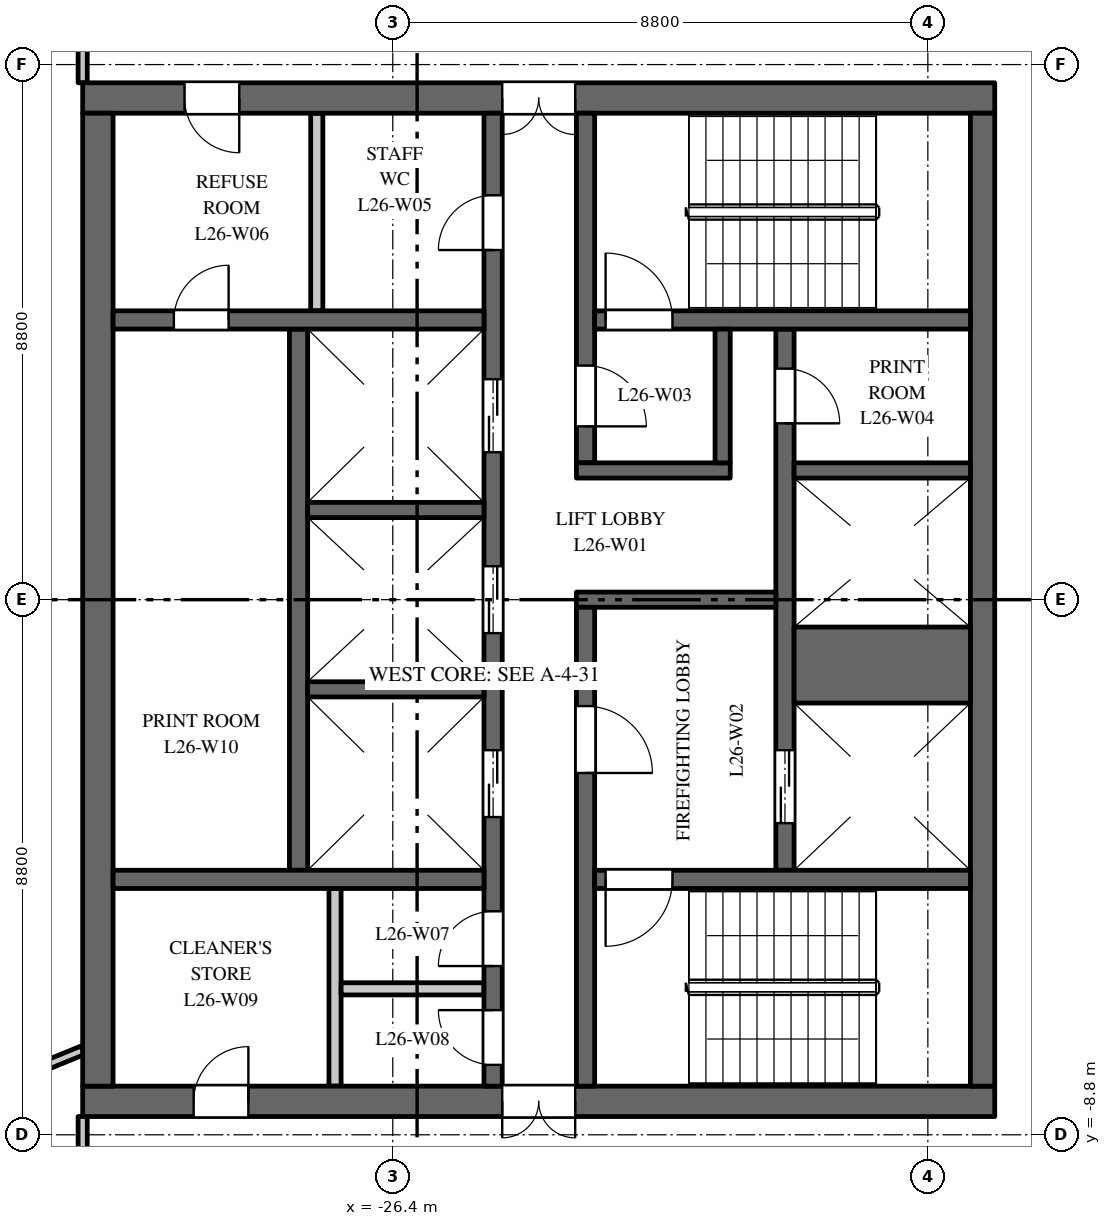
"""IFC4 building model, lengths in metres.
Left out: names, types, materials, properties, quantities, classifications, styles, units other than length and angle.
Written with IfcOpenShell. Run it as: python <this file> out.ifc"""

import sys

from ifc_helpers import new_model, si_unit, direction, frame, frame_2d, origin, place, context, subcontext, project, spatial, rectangle, extrude, element, fill, save


model = new_model("IFC4")
c1 = context("Model", 3, precision=1e-05, world=origin(), true_north=direction((0.0, 1.0)))
c2 = subcontext(c1, "Body", "Model", "MODEL_VIEW")
j1 = project(units=[si_unit("LENGTHUNIT", "METRE"), si_unit("PLANEANGLEUNIT", "RADIAN")], contexts=[c1])
p1 = place(None, origin())
s1 = spatial("IfcSite", under=j1, at=p1, CompositionType="ELEMENT")
p2 = place(p1, origin())
s2 = spatial("IfcBuilding", under=s1, at=p2, CompositionType="ELEMENT")
p3 = place(p2, frame((0.0, 0.0, 116.0)))
s3 = spatial("IfcBuildingStorey", under=s2, at=p3, CompositionType="ELEMENT", Elevation=116.0)
p4 = place(p3, frame((-16.5, 8.25, 0.0), z_axis=(0.0, 0.0, 1.0), x_axis=(-1.0, 0.0, 0.0)))
e1 = element("IfcWall", 1, at=p4, inside=s3, PredefinedType="SHEAR", context=c2, shape_type="SweptSolid", body=[
    extrude(rectangle(XDim=15.0, YDim=0.5, at=frame_2d((7.5, 0.0))), origin(), (0.0, 0.0, 1.0), 3.7),
])
p5 = place(p4, frame((6.9, 0.0, 0.0)))
e2 = element("IfcOpeningElement", 2, at=p5, cuts=e1, PredefinedType="OPENING", context=c2, shape_type="SweptSolid", body=[
    extrude(rectangle(XDim=1.2, YDim=2.1, at=frame_2d((0.6, 1.05))), frame((0.0, 0.26, 0.0), z_axis=(0.0, -1.0, 0.0), x_axis=(1.0, 0.0, 0.0)), (0.0, 0.0, 1.0), 0.52),
])
p6 = place(p4, frame((12.425, 0.0, 0.0)))
e3 = element("IfcOpeningElement", 3, at=p6, cuts=e1, PredefinedType="OPENING", context=c2, shape_type="SweptSolid", body=[
    extrude(rectangle(XDim=0.9, YDim=2.1, at=frame_2d((0.45, 1.05))), frame((0.0, 0.26, 0.0), z_axis=(0.0, -1.0, 0.0), x_axis=(1.0, 0.0, 0.0)), (0.0, 0.0, 1.0), 0.52),
])
p7 = place(p3, frame((-16.5, -8.25, 0.0), z_axis=(0.0, 0.0, 1.0), x_axis=(-1.0, 0.0, 0.0)))
e4 = element("IfcWall", 4, at=p7, inside=s3, PredefinedType="SHEAR", context=c2, shape_type="SweptSolid", body=[
    extrude(rectangle(XDim=15.0, YDim=0.5, at=frame_2d((7.5, 0.0))), origin(), (0.0, 0.0, 1.0), 3.7),
])
p8 = place(p7, frame((6.9, 0.0, 0.0)))
e5 = element("IfcOpeningElement", 5, at=p8, cuts=e4, PredefinedType="OPENING", context=c2, shape_type="SweptSolid", body=[
    extrude(rectangle(XDim=1.2, YDim=2.1, at=frame_2d((0.6, 1.05))), frame((0.0, 0.26, 0.0), z_axis=(0.0, -1.0, 0.0), x_axis=(1.0, 0.0, 0.0)), (0.0, 0.0, 1.0), 0.52),
])
p9 = place(p7, frame((12.275, 0.0, 0.0)))
e6 = element("IfcOpeningElement", 6, at=p9, cuts=e4, PredefinedType="OPENING", context=c2, shape_type="SweptSolid", body=[
    extrude(rectangle(XDim=0.9, YDim=2.1, at=frame_2d((0.45, 1.05))), frame((0.0, 0.26, 0.0), z_axis=(0.0, -1.0, 0.0), x_axis=(1.0, 0.0, 0.0)), (0.0, 0.0, 1.0), 0.52),
])
p10 = place(p3, frame((-27.95, -4.45, 0.0), z_axis=(0.0, 0.0, 1.0), x_axis=(0.0, 1.0, 0.0)))
e7 = element("IfcWall", 7, at=p10, inside=s3, PredefinedType="SHEAR", context=c2, shape_type="SweptSolid", body=[
    extrude(rectangle(XDim=8.9, YDim=0.3, at=frame_2d((4.45, 0.0))), origin(), (0.0, 0.0, 1.0), 3.7),
])
p11 = place(p3, frame((-19.95, -4.45, 0.0), z_axis=(0.0, 0.0, 1.0), x_axis=(0.0, 1.0, 0.0)))
e8 = element("IfcWall", 8, at=p11, inside=s3, PredefinedType="SHEAR", context=c2, shape_type="SweptSolid", body=[
    extrude(rectangle(XDim=8.9, YDim=0.3, at=frame_2d((4.45, 0.0))), origin(), (0.0, 0.0, 1.0), 3.7),
])
p12 = place(p11, frame((0.775, 0.0, 0.0)))
e9 = element("IfcOpeningElement", 9, at=p12, cuts=e8, PredefinedType="OPENING", context=c2, shape_type="SweptSolid", body=[
    extrude(rectangle(XDim=1.2, YDim=2.1, at=frame_2d((0.6, 1.05))), frame((0.0, 0.16, 0.0), z_axis=(0.0, -1.0, 0.0), x_axis=(1.0, 0.0, 0.0)), (0.0, 0.0, 1.0), 0.32),
])
p13 = place(p11, frame((7.35, 0.0, 0.0)))
e10 = element("IfcOpeningElement", 10, at=p13, cuts=e8, PredefinedType="OPENING", context=c2, shape_type="SweptSolid", body=[
    extrude(rectangle(XDim=0.9, YDim=2.1, at=frame_2d((0.45, 1.05))), frame((0.0, 0.16, 0.0), z_axis=(0.0, -1.0, 0.0), x_axis=(1.0, 0.0, 0.0)), (0.0, 0.0, 1.0), 0.32),
])
p14 = place(p3, frame((-24.75, -8.0, 0.0), z_axis=(0.0, 0.0, 1.0), x_axis=(0.0, 1.0, 0.0)))
e11 = element("IfcWall", 11, at=p14, inside=s3, PredefinedType="SHEAR", context=c2, shape_type="SweptSolid", body=[
    extrude(rectangle(XDim=16.0, YDim=0.3, at=frame_2d((8.0, 0.0))), origin(), (0.0, 0.0, 1.0), 3.7),
])
p15 = place(p14, frame((4.425, 0.0, 0.0)))
e12 = element("IfcOpeningElement", 12, at=p15, cuts=e11, PredefinedType="OPENING", context=c2, shape_type="SweptSolid", body=[
    extrude(rectangle(XDim=1.1, YDim=2.1, at=frame_2d((0.55, 1.05))), frame((0.0, 0.16, 0.0), z_axis=(0.0, -1.0, 0.0), x_axis=(1.0, 0.0, 0.0)), (0.0, 0.0, 1.0), 0.32),
])
p16 = place(p14, frame((7.45, 0.0, 0.0)))
e13 = element("IfcOpeningElement", 13, at=p16, cuts=e11, PredefinedType="OPENING", context=c2, shape_type="SweptSolid", body=[
    extrude(rectangle(XDim=1.1, YDim=2.1, at=frame_2d((0.55, 1.05))), frame((0.0, 0.16, 0.0), z_axis=(0.0, -1.0, 0.0), x_axis=(1.0, 0.0, 0.0)), (0.0, 0.0, 1.0), 0.32),
])
p17 = place(p14, frame((10.425, 0.0, 0.0)))
e14 = element("IfcOpeningElement", 14, at=p17, cuts=e11, PredefinedType="OPENING", context=c2, shape_type="SweptSolid", body=[
    extrude(rectangle(XDim=1.2, YDim=2.1, at=frame_2d((0.6, 1.05))), frame((0.0, 0.16, 0.0), z_axis=(0.0, -1.0, 0.0), x_axis=(1.0, 0.0, 0.0)), (0.0, 0.0, 1.0), 0.32),
])
p18 = place(p14, frame((13.75, 0.0, 0.0)))
e15 = element("IfcOpeningElement", 15, at=p18, cuts=e11, PredefinedType="OPENING", context=c2, shape_type="SweptSolid", body=[
    extrude(rectangle(XDim=0.9, YDim=2.1, at=frame_2d((0.45, 1.05))), frame((0.0, 0.16, 0.0), z_axis=(0.0, -1.0, 0.0), x_axis=(1.0, 0.0, 0.0)), (0.0, 0.0, 1.0), 0.32),
])
p19 = place(p14, frame((1.975, 0.0, 0.0)))
e16 = element("IfcOpeningElement", 16, at=p19, cuts=e11, PredefinedType="OPENING", context=c2, shape_type="SweptSolid", body=[
    extrude(rectangle(XDim=0.9, YDim=2.1, at=frame_2d((0.45, 1.05))), frame((0.0, 0.16, 0.0), z_axis=(0.0, -1.0, 0.0), x_axis=(1.0, 0.0, 0.0)), (0.0, 0.0, 1.0), 0.32),
])
p20 = place(p14, frame((0.35, 0.0, 0.0)))
e17 = element("IfcOpeningElement", 17, at=p20, cuts=e11, PredefinedType="OPENING", context=c2, shape_type="SweptSolid", body=[
    extrude(rectangle(XDim=0.9, YDim=2.1, at=frame_2d((0.45, 1.05))), frame((0.0, 0.16, 0.0), z_axis=(0.0, -1.0, 0.0), x_axis=(1.0, 0.0, 0.0)), (0.0, 0.0, 1.0), 0.32),
])
p21 = place(p3, frame((-20.1, 0.0, 0.0), z_axis=(0.0, 0.0, 1.0), x_axis=(-1.0, 0.0, 0.0)))
e18 = element("IfcWall", 18, at=p21, inside=s3, PredefinedType="SHEAR", context=c2, shape_type="SweptSolid", body=[
    extrude(rectangle(XDim=3.28, YDim=0.25, at=frame_2d((1.64, 0.0))), origin(), (0.0, 0.0, 1.0), 3.7),
])
p22 = place(p3, frame((-16.7, -8.0, 0.0), z_axis=(0.0, 0.0, 1.0), x_axis=(0.0, 1.0, 0.0)))
e19 = element("IfcWall", 19, at=p22, inside=s3, PredefinedType="SHEAR", context=c2, shape_type="SweptSolid", body=[
    extrude(rectangle(XDim=16.0, YDim=0.4, at=frame_2d((8.0, 0.0))), origin(), (0.0, 0.0, 1.0), 3.7),
])
p23 = place(p3, frame((-31.25, -8.0, 0.0), z_axis=(0.0, 0.0, 1.0), x_axis=(0.0, 1.0, 0.0)))
e20 = element("IfcWall", 20, at=p23, inside=s3, PredefinedType="SHEAR", context=c2, shape_type="SweptSolid", body=[
    extrude(rectangle(XDim=16.0, YDim=0.5, at=frame_2d((8.0, 0.0))), origin(), (0.0, 0.0, 1.0), 3.7),
])
p24 = place(p3, frame((-24.9, 4.6, 0.0), z_axis=(0.0, 0.0, 1.0), x_axis=(-1.0, 0.0, 0.0)))
e21 = element("IfcWall", 21, at=p24, inside=s3, PredefinedType="SHEAR", context=c2, shape_type="SweptSolid", body=[
    extrude(rectangle(XDim=6.1, YDim=0.3, at=frame_2d((3.05, 0.0))), origin(), (0.0, 0.0, 1.0), 3.7),
])
p25 = place(p24, frame((4.2, 0.0, 0.0)))
e22 = element("IfcOpeningElement", 22, at=p25, cuts=e21, PredefinedType="OPENING", context=c2, shape_type="SweptSolid", body=[
    extrude(rectangle(XDim=0.9, YDim=2.1, at=frame_2d((0.45, 1.05))), frame((0.0, 0.16, 0.0), z_axis=(0.0, -1.0, 0.0), x_axis=(1.0, 0.0, 0.0)), (0.0, 0.0, 1.0), 0.32),
])
for number, where, z_axis, x_axis in (
    (23, (-27.65, 4.75, 0.0), (0.0, 0.0, 1.0), (0.0, 1.0, 0.0)),
    (24, (-27.35, -8.0, 0.0), (0.0, 0.0, 1.0), (0.0, 1.0, 0.0)),
):
    element("IfcWall", number, at=place(p3, frame(where, z_axis=z_axis, x_axis=x_axis)), inside=s3, PredefinedType="PARTITIONING", context=c2, shape_type="SweptSolid", body=[
        extrude(rectangle(XDim=3.25, YDim=0.2, at=frame_2d((1.625, 0.0))), origin(), (0.0, 0.0, 1.0), 3.7),
    ])
p26 = place(p3, frame((-24.9, -6.4, 0.0), z_axis=(0.0, 0.0, 1.0), x_axis=(-1.0, 0.0, 0.0)))
e25 = element("IfcWall", 25, at=p26, inside=s3, PredefinedType="PARTITIONING", context=c2, shape_type="SweptSolid", body=[
    extrude(rectangle(XDim=2.35, YDim=0.2, at=frame_2d((1.175, 0.0))), origin(), (0.0, 0.0, 1.0), 3.7),
])
p27 = place(p3, frame((-24.9, -4.6, 0.0), z_axis=(0.0, 0.0, 1.0), x_axis=(-1.0, 0.0, 0.0)))
e26 = element("IfcWall", 26, at=p27, inside=s3, PredefinedType="SHEAR", context=c2, shape_type="SweptSolid", body=[
    extrude(rectangle(XDim=6.1, YDim=0.3, at=frame_2d((3.05, 0.0))), origin(), (0.0, 0.0, 1.0), 3.7),
])
p28 = place(p3, frame((-16.9, -1.075, 0.0), z_axis=(0.0, 0.0, 1.0), x_axis=(-1.0, 0.0, 0.0)))
e27 = element("IfcWall", 27, at=p28, inside=s3, PredefinedType="SHEAR", context=c2, shape_type="SweptSolid", body=[
    extrude(rectangle(XDim=2.9, YDim=1.25, at=frame_2d((1.45, 0.0))), origin(), (0.0, 0.0, 1.0), 3.7),
])
for number, where, z_axis, x_axis in (
    (28, (-16.9, 2.125, 0.0), (0.0, 0.0, 1.0), (-1.0, 0.0, 0.0)),
    (29, (-24.9, -1.475, 0.0), (0.0, 0.0, 1.0), (-1.0, 0.0, 0.0)),
    (30, (-24.9, 1.475, 0.0), (0.0, 0.0, 1.0), (-1.0, 0.0, 0.0)),
):
    element("IfcWall", number, at=place(p3, frame(where, z_axis=z_axis, x_axis=x_axis)), inside=s3, PredefinedType="SHEAR", context=c2, shape_type="SweptSolid", body=[
        extrude(rectangle(XDim=2.9, YDim=0.25, at=frame_2d((1.45, 0.0))), origin(), (0.0, 0.0, 1.0), 3.7),
    ])
p29 = place(p3, frame((-23.23, 2.25, 0.0), z_axis=(0.0, 0.0, 1.0), x_axis=(0.0, 1.0, 0.0)))
e31 = element("IfcWall", 31, at=p29, inside=s3, PredefinedType="SHEAR", context=c2, shape_type="SweptSolid", body=[
    extrude(rectangle(XDim=5.75, YDim=0.3, at=frame_2d((2.875, 0.0))), origin(), (0.0, 0.0, 1.0), 3.7),
])
p30 = place(p29, frame((0.6, 0.0, 0.0)))
e32 = element("IfcOpeningElement", 32, at=p30, cuts=e31, PredefinedType="OPENING", context=c2, shape_type="SweptSolid", body=[
    extrude(rectangle(XDim=1.0, YDim=2.1, at=frame_2d((0.5, 1.05))), frame((0.0, 0.16, 0.0), z_axis=(0.0, -1.0, 0.0), x_axis=(1.0, 0.0, 0.0)), (0.0, 0.0, 1.0), 0.32),
])
p31 = place(p3, frame((-23.23, -8.0, 0.0), z_axis=(0.0, 0.0, 1.0), x_axis=(0.0, 1.0, 0.0)))
e33 = element("IfcWall", 33, at=p31, inside=s3, PredefinedType="SHEAR", context=c2, shape_type="SweptSolid", body=[
    extrude(rectangle(XDim=7.875, YDim=0.3, at=frame_2d((3.938, 0.0))), origin(), (0.0, 0.0, 1.0), 3.7),
])
p32 = place(p31, frame((5.15, 0.0, 0.0)))
e34 = element("IfcOpeningElement", 34, at=p32, cuts=e33, PredefinedType="OPENING", context=c2, shape_type="SweptSolid", body=[
    extrude(rectangle(XDim=1.1, YDim=2.1, at=frame_2d((0.55, 1.05))), frame((0.0, 0.16, 0.0), z_axis=(0.0, -1.0, 0.0), x_axis=(1.0, 0.0, 0.0)), (0.0, 0.0, 1.0), 0.32),
])
p33 = place(p3, frame((-16.9, 4.6, 0.0), z_axis=(0.0, 0.0, 1.0), x_axis=(-1.0, 0.0, 0.0)))
e35 = element("IfcWall", 35, at=p33, inside=s3, PredefinedType="SHEAR", context=c2, shape_type="SweptSolid", body=[
    extrude(rectangle(XDim=6.18, YDim=0.3, at=frame_2d((3.09, 0.0))), origin(), (0.0, 0.0, 1.0), 3.7),
])
p34 = place(p33, frame((4.9, 0.0, 0.0)))
e36 = element("IfcOpeningElement", 36, at=p34, cuts=e35, PredefinedType="OPENING", context=c2, shape_type="SweptSolid", body=[
    extrude(rectangle(XDim=1.1, YDim=2.1, at=frame_2d((0.55, 1.05))), frame((0.0, 0.16, 0.0), z_axis=(0.0, -1.0, 0.0), x_axis=(1.0, 0.0, 0.0)), (0.0, 0.0, 1.0), 0.32),
])
p35 = place(p3, frame((-16.9, -4.6, 0.0), z_axis=(0.0, 0.0, 1.0), x_axis=(-1.0, 0.0, 0.0)))
e37 = element("IfcWall", 37, at=p35, inside=s3, PredefinedType="SHEAR", context=c2, shape_type="SweptSolid", body=[
    extrude(rectangle(XDim=6.18, YDim=0.3, at=frame_2d((3.09, 0.0))), origin(), (0.0, 0.0, 1.0), 3.7),
])
p36 = place(p35, frame((4.9, 0.0, 0.0)))
e38 = element("IfcOpeningElement", 38, at=p36, cuts=e37, PredefinedType="OPENING", context=c2, shape_type="SweptSolid", body=[
    extrude(rectangle(XDim=1.1, YDim=2.1, at=frame_2d((0.55, 1.05))), frame((0.0, 0.16, 0.0), z_axis=(0.0, -1.0, 0.0), x_axis=(1.0, 0.0, 0.0)), (0.0, 0.0, 1.0), 0.32),
])
p37 = place(p3, frame((-20.85, 2.125, 0.0), z_axis=(0.0, 0.0, 1.0), x_axis=(-1.0, 0.0, 0.0)))
e39 = element("IfcWall", 39, at=p37, inside=s3, PredefinedType="SHEAR", context=c2, shape_type="SweptSolid", body=[
    extrude(rectangle(XDim=2.53, YDim=0.25, at=frame_2d((1.265, 0.0))), origin(), (0.0, 0.0, 1.0), 3.7),
])
p38 = place(p3, frame((-20.975, 2.25, 0.0), z_axis=(0.0, 0.0, 1.0), x_axis=(0.0, 1.0, 0.0)))
e40 = element("IfcWall", 40, at=p38, inside=s3, PredefinedType="SHEAR", context=c2, shape_type="SweptSolid", body=[
    extrude(rectangle(XDim=2.2, YDim=0.25, at=frame_2d((1.1, 0.0))), origin(), (0.0, 0.0, 1.0), 3.7),
])
p39 = place(p3, frame((-34.234, -8.53, 0.0), z_axis=(0.0, 0.0, 1.0), x_axis=(0.925344112436, 0.379128307542, 0.0)))
e41 = element("IfcWall", 41, at=p39, inside=s3, PredefinedType="PARTITIONING", context=c2, shape_type="SweptSolid", body=[
    extrude(rectangle(XDim=2.954, YDim=0.15, at=frame_2d((1.477, 0.0))), origin(), (0.0, 0.0, 1.0), 2.9),
])
for number, where, z_axis, x_axis in (
    (42, (-31.5, -10.7, 0.0), (0.0, 0.0, 1.0), (0.0, 1.0, 0.0)),
    (43, (-31.5, 8.5, 0.0), (0.0, 0.0, 1.0), (0.0, 1.0, 0.0)),
):
    element("IfcWall", number, at=place(p3, frame(where, z_axis=z_axis, x_axis=x_axis)), inside=s3, PredefinedType="PARTITIONING", context=c2, shape_type="SweptSolid", body=[
        extrude(rectangle(XDim=2.2, YDim=0.15, at=frame_2d((1.1, 0.0))), origin(), (0.0, 0.0, 1.0), 3.7),
    ])
p40 = place(p12, origin())
e44 = element("IfcDoor", 44, at=p40, inside=s3, OperationType="DOUBLE_DOOR_SLIDING", PredefinedType="DOOR", context=c2, shape_type="SweptSolid", body=[
    extrude(rectangle(XDim=1.2, YDim=2.1, at=frame_2d((0.6, 1.05))), frame((0.0, 0.025, 0.0), z_axis=(0.0, -1.0, 0.0), x_axis=(1.0, 0.0, 0.0)), (0.0, 0.0, 1.0), 0.05),
])
fill(e9, e44)
p41 = place(p15, origin())
e45 = element("IfcDoor", 45, at=p41, inside=s3, OperationType="DOUBLE_DOOR_SLIDING", PredefinedType="DOOR", context=c2, shape_type="SweptSolid", body=[
    extrude(rectangle(XDim=1.1, YDim=2.1, at=frame_2d((0.55, 1.05))), frame((0.0, 0.025, 0.0), z_axis=(0.0, -1.0, 0.0), x_axis=(1.0, 0.0, 0.0)), (0.0, 0.0, 1.0), 0.05),
])
fill(e12, e45)
p42 = place(p16, origin())
e46 = element("IfcDoor", 46, at=p42, inside=s3, OperationType="DOUBLE_DOOR_SLIDING", PredefinedType="DOOR", context=c2, shape_type="SweptSolid", body=[
    extrude(rectangle(XDim=1.1, YDim=2.1, at=frame_2d((0.55, 1.05))), frame((0.0, 0.025, 0.0), z_axis=(0.0, -1.0, 0.0), x_axis=(1.0, 0.0, 0.0)), (0.0, 0.0, 1.0), 0.05),
])
fill(e13, e46)
p43 = place(p17, origin())
e47 = element("IfcDoor", 47, at=p43, inside=s3, OperationType="DOUBLE_DOOR_SLIDING", PredefinedType="DOOR", context=c2, shape_type="SweptSolid", body=[
    extrude(rectangle(XDim=1.2, YDim=2.1, at=frame_2d((0.6, 1.05))), frame((0.0, 0.025, 0.0), z_axis=(0.0, -1.0, 0.0), x_axis=(1.0, 0.0, 0.0)), (0.0, 0.0, 1.0), 0.05),
])
fill(e14, e47)
p44 = place(p34, origin())
e48 = element("IfcDoor", 48, at=p44, inside=s3, OperationType="SINGLE_SWING_RIGHT", PredefinedType="DOOR", context=c2, shape_type="SweptSolid", body=[
    extrude(rectangle(XDim=1.1, YDim=2.1, at=frame_2d((0.55, 1.05))), frame((0.0, 0.025, 0.0), z_axis=(0.0, -1.0, 0.0), x_axis=(1.0, 0.0, 0.0)), (0.0, 0.0, 1.0), 0.05),
])
fill(e36, e48)
p45 = place(p36, origin())
e49 = element("IfcDoor", 49, at=p45, inside=s3, OperationType="SINGLE_SWING_LEFT", PredefinedType="DOOR", context=c2, shape_type="SweptSolid", body=[
    extrude(rectangle(XDim=1.1, YDim=2.1, at=frame_2d((0.55, 1.05))), frame((0.0, 0.025, 0.0), z_axis=(0.0, -1.0, 0.0), x_axis=(1.0, 0.0, 0.0)), (0.0, 0.0, 1.0), 0.05),
])
fill(e38, e49)
p46 = place(p32, origin())
e50 = element("IfcDoor", 50, at=p46, inside=s3, OperationType="SINGLE_SWING_LEFT", PredefinedType="DOOR", context=c2, shape_type="SweptSolid", body=[
    extrude(rectangle(XDim=1.1, YDim=2.1, at=frame_2d((0.55, 1.05))), frame((0.0, 0.025, 0.0), z_axis=(0.0, -1.0, 0.0), x_axis=(1.0, 0.0, 0.0)), (0.0, 0.0, 1.0), 0.05),
])
fill(e34, e50)
p47 = place(p30, origin())
e51 = element("IfcDoor", 51, at=p47, inside=s3, OperationType="SINGLE_SWING_LEFT", PredefinedType="DOOR", context=c2, shape_type="SweptSolid", body=[
    extrude(rectangle(XDim=1.0, YDim=2.1, at=frame_2d((0.5, 1.05))), frame((0.0, 0.025, 0.0), z_axis=(0.0, -1.0, 0.0), x_axis=(1.0, 0.0, 0.0)), (0.0, 0.0, 1.0), 0.05),
])
fill(e32, e51)
p48 = place(p5, origin())
e52 = element("IfcDoor", 52, at=p48, inside=s3, OperationType="DOUBLE_DOOR_DOUBLE_SWING", PredefinedType="DOOR", context=c2, shape_type="SweptSolid", body=[
    extrude(rectangle(XDim=1.2, YDim=2.1, at=frame_2d((0.6, 1.05))), frame((0.0, 0.025, 0.0), z_axis=(0.0, -1.0, 0.0), x_axis=(1.0, 0.0, 0.0)), (0.0, 0.0, 1.0), 0.05),
])
fill(e2, e52)
p49 = place(p8, origin())
e53 = element("IfcDoor", 53, at=p49, inside=s3, OperationType="DOUBLE_DOOR_DOUBLE_SWING", PredefinedType="DOOR", context=c2, shape_type="SweptSolid", body=[
    extrude(rectangle(XDim=1.2, YDim=2.1, at=frame_2d((0.6, 1.05))), frame((0.0, 0.025, 0.0), z_axis=(0.0, -1.0, 0.0), x_axis=(1.0, 0.0, 0.0)), (0.0, 0.0, 1.0), 0.05),
])
fill(e5, e53)
p50 = place(p13, origin())
e54 = element("IfcDoor", 54, at=p50, inside=s3, OperationType="SINGLE_SWING_LEFT", PredefinedType="DOOR", context=c2, shape_type="SweptSolid", body=[
    extrude(rectangle(XDim=0.9, YDim=2.1, at=frame_2d((0.45, 1.05))), frame((0.0, 0.025, 0.0), z_axis=(0.0, -1.0, 0.0), x_axis=(1.0, 0.0, 0.0)), (0.0, 0.0, 1.0), 0.05),
])
fill(e10, e54)
p51 = place(p18, origin())
e55 = element("IfcDoor", 55, at=p51, inside=s3, OperationType="SINGLE_SWING_RIGHT", PredefinedType="DOOR", context=c2, shape_type="SweptSolid", body=[
    extrude(rectangle(XDim=0.9, YDim=2.1, at=frame_2d((0.45, 1.05))), frame((0.0, 0.025, 0.0), z_axis=(0.0, -1.0, 0.0), x_axis=(1.0, 0.0, 0.0)), (0.0, 0.0, 1.0), 0.05),
])
fill(e15, e55)
p52 = place(p6, origin())
e56 = element("IfcDoor", 56, at=p52, inside=s3, OperationType="SINGLE_SWING_RIGHT", PredefinedType="DOOR", context=c2, shape_type="SweptSolid", body=[
    extrude(rectangle(XDim=0.9, YDim=2.1, at=frame_2d((0.45, 1.05))), frame((0.0, 0.025, 0.0), z_axis=(0.0, -1.0, 0.0), x_axis=(1.0, 0.0, 0.0)), (0.0, 0.0, 1.0), 0.05),
])
fill(e3, e56)
p53 = place(p19, origin())
e57 = element("IfcDoor", 57, at=p53, inside=s3, OperationType="SINGLE_SWING_RIGHT", PredefinedType="DOOR", context=c2, shape_type="SweptSolid", body=[
    extrude(rectangle(XDim=0.9, YDim=2.1, at=frame_2d((0.45, 1.05))), frame((0.0, 0.025, 0.0), z_axis=(0.0, -1.0, 0.0), x_axis=(1.0, 0.0, 0.0)), (0.0, 0.0, 1.0), 0.05),
])
fill(e16, e57)
p54 = place(p20, origin())
e58 = element("IfcDoor", 58, at=p54, inside=s3, OperationType="SINGLE_SWING_LEFT", PredefinedType="DOOR", context=c2, shape_type="SweptSolid", body=[
    extrude(rectangle(XDim=0.9, YDim=2.1, at=frame_2d((0.45, 1.05))), frame((0.0, 0.025, 0.0), z_axis=(0.0, -1.0, 0.0), x_axis=(1.0, 0.0, 0.0)), (0.0, 0.0, 1.0), 0.05),
])
fill(e17, e58)
p55 = place(p9, origin())
e59 = element("IfcDoor", 59, at=p55, inside=s3, OperationType="SINGLE_SWING_LEFT", PredefinedType="DOOR", context=c2, shape_type="SweptSolid", body=[
    extrude(rectangle(XDim=0.9, YDim=2.1, at=frame_2d((0.45, 1.05))), frame((0.0, 0.025, 0.0), z_axis=(0.0, -1.0, 0.0), x_axis=(1.0, 0.0, 0.0)), (0.0, 0.0, 1.0), 0.05),
])
fill(e6, e59)
p56 = place(p25, origin())
e60 = element("IfcDoor", 60, at=p56, inside=s3, OperationType="SINGLE_SWING_LEFT", PredefinedType="DOOR", context=c2, shape_type="SweptSolid", body=[
    extrude(rectangle(XDim=0.9, YDim=2.1, at=frame_2d((0.45, 1.05))), frame((0.0, 0.025, 0.0), z_axis=(0.0, -1.0, 0.0), x_axis=(1.0, 0.0, 0.0)), (0.0, 0.0, 1.0), 0.05),
])
fill(e22, e60)
save(model, sys.argv[1])
